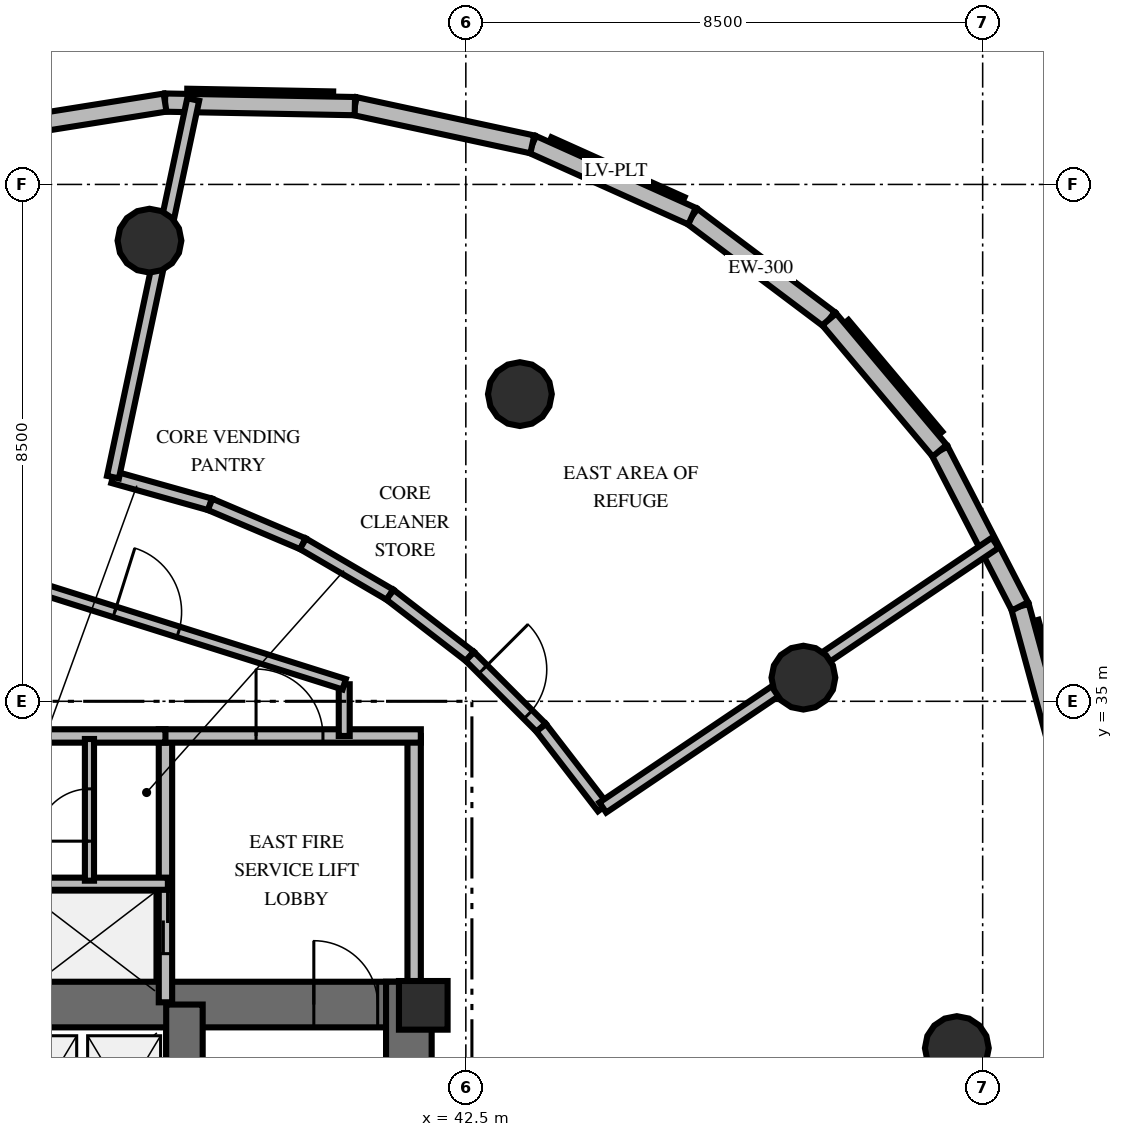
"""IFC4 building model, lengths in metres.
Left out: names, types, materials, properties, quantities, classifications, styles, units other than length and angle.
Written with IfcOpenShell. Run it as: python <this file> out.ifc"""

import sys

from ifc_helpers import new_model, si_unit, direction, frame, frame_2d, origin, origin_2d, place, context, subcontext, project, spatial, rectangle, circle, extrude, element, fill, save


model = new_model("IFC4")
c1 = context("Model", 3, precision=1e-05, world=origin(), true_north=direction((0.0, 1.0)))
c2 = subcontext(c1, "Body", "Model", "MODEL_VIEW")
j1 = project(units=[si_unit("LENGTHUNIT", "METRE"), si_unit("PLANEANGLEUNIT", "RADIAN")], contexts=[c1])
p1 = place(None, origin())
s1 = spatial("IfcSite", under=j1, at=p1, CompositionType="ELEMENT")
p2 = place(p1, origin())
s2 = spatial("IfcBuilding", under=s1, at=p2, CompositionType="ELEMENT")
p3 = place(p2, frame((0.0, 0.0, 225.4)))
s3 = spatial("IfcBuildingStorey", under=s2, at=p3, CompositionType="ELEMENT", Elevation=225.4)
p4 = place(p3, frame((26.072, 30.013, 0.0), z_axis=(0.0, 0.0, 1.0), x_axis=(1.0, 0.0, 0.0)))
e1 = element("IfcWall", 1, at=p4, inside=s3, PredefinedType="SHEAR", context=c2, shape_type="SweptSolid", body=[
    extrude(rectangle(XDim=15.866, YDim=0.75, at=frame_2d((7.933, 0.0))), origin(), (0.0, 0.0, 1.0), 5.0),
])
p5 = place(p4, frame((0.878, 0.0, 0.0)))
e2 = element("IfcOpeningElement", 2, at=p5, cuts=e1, PredefinedType="OPENING", context=c2, shape_type="SweptSolid", body=[
    extrude(rectangle(XDim=1.05, YDim=2.15, at=frame_2d((0.525, 1.075))), frame((0.0, 0.385, 0.0), z_axis=(0.0, -1.0, 0.0), x_axis=(1.0, 0.0, 0.0)), (0.0, 0.0, 1.0), 0.77),
])
p6 = place(p4, frame((13.928, 0.0, 0.0)))
e3 = element("IfcOpeningElement", 3, at=p6, cuts=e1, PredefinedType="OPENING", context=c2, shape_type="SweptSolid", body=[
    extrude(rectangle(XDim=1.05, YDim=2.15, at=frame_2d((0.525, 1.075))), frame((0.0, 0.385, 0.0), z_axis=(0.0, -1.0, 0.0), x_axis=(1.0, 0.0, 0.0)), (0.0, 0.0, 1.0), 0.77),
])
p7 = place(p4, frame((7.378, 0.0, 0.0)))
e4 = element("IfcOpeningElement", 4, at=p7, cuts=e1, PredefinedType="OPENING", context=c2, shape_type="SweptSolid", body=[
    extrude(rectangle(XDim=1.1, YDim=2.15, at=frame_2d((0.55, 1.075))), frame((0.0, 0.385, 0.0), z_axis=(0.0, -1.0, 0.0), x_axis=(1.0, 0.0, 0.0)), (0.0, 0.0, 1.0), 0.77),
])
p8 = place(p3, frame((41.563, 19.812, 0.0), z_axis=(0.0, 0.0, 1.0), x_axis=(0.0, 1.0, 0.0)))
e5 = element("IfcWall", 5, at=p8, inside=s3, PredefinedType="SHEAR", context=c2, shape_type="SweptSolid", body=[
    extrude(rectangle(XDim=10.576, YDim=0.75, at=frame_2d((5.288, 0.0))), origin(), (0.0, 0.0, 1.0), 5.0),
])
p9 = place(p3, frame((37.872, 20.187, 0.0), z_axis=(0.0, 0.0, 1.0), x_axis=(0.0, 1.0, 0.0)))
e6 = element("IfcWall", 6, at=p9, inside=s3, PredefinedType="SHEAR", context=c2, shape_type="SweptSolid", body=[
    extrude(rectangle(XDim=9.826, YDim=0.6, at=frame_2d((4.913, 0.0))), origin(), (0.0, 0.0, 1.0), 5.0),
])
p10 = place(p3, frame((41.8, 30.0, 0.0), z_axis=(0.0, 0.0, 1.0), x_axis=(1.0, 0.0, 0.0)))
e7 = element("IfcColumn", 7, at=p10, inside=s3, PredefinedType="PILASTER", context=c2, shape_type="SweptSolid", body=[
    extrude(rectangle(XDim=0.8, YDim=0.8, at=origin_2d()), origin(), (0.0, 0.0, 1.0), 5.0),
])
for number, where, z_axis, x_axis in (
    (8, (50.575, 29.297, 0.0), (0.0, 0.0, 1.0), (1.0, 0.0, 0.0)),
    (9, (48.052, 35.389, 0.0), (0.0, 0.0, 1.0), (1.0, 0.0, 0.0)),
    (10, (43.389, 40.052, 0.0), (0.0, 0.0, 1.0), (1.0, 0.0, 0.0)),
    (11, (37.297, 42.575, 0.0), (0.0, 0.0, 1.0), (1.0, 0.0, 0.0)),
):
    element("IfcColumn", number, at=place(p3, frame(where, z_axis=z_axis, x_axis=x_axis)), inside=s3, PredefinedType="COLUMN", context=c2, shape_type="SweptSolid", body=[
        extrude(circle(Radius=0.525, at=origin_2d()), origin(), (0.0, 0.0, 1.0), 4.78),
    ])
p11 = place(p3, frame((48.477, 41.282, 0.0), z_axis=(0.0, 0.0, 1.0), x_axis=(-0.799210477485, 0.601051256282, 0.0)))
e12 = element("IfcWall", 12, at=p11, inside=s3, PredefinedType="SOLIDWALL", context=c2, shape_type="SweptSolid", body=[
    extrude(rectangle(XDim=2.823, YDim=0.3, at=frame_2d((1.411, 0.0))), origin(), (0.0, 0.0, 1.0), 4.06),
])
p12 = place(p3, frame((46.221, 42.978, 0.0), z_axis=(0.0, 0.0, 1.0), x_axis=(-0.912125984166, 0.409909976714, 0.0)))
e13 = element("IfcWall", 13, at=p12, inside=s3, PredefinedType="SOLIDWALL", context=c2, shape_type="SweptSolid", body=[
    extrude(rectangle(XDim=2.88, YDim=0.3, at=frame_2d((1.44, 0.0))), origin(), (0.0, 0.0, 1.0), 4.06),
])
p13 = place(p3, frame((43.594, 44.159, 0.0), z_axis=(0.0, 0.0, 1.0), x_axis=(-0.977563651591, 0.210640231409, 0.0)))
e14 = element("IfcWall", 14, at=p13, inside=s3, PredefinedType="SOLIDWALL", context=c2, shape_type="SweptSolid", body=[
    extrude(rectangle(XDim=2.986, YDim=0.3, at=frame_2d((1.493, 0.0))), origin(), (0.0, 0.0, 1.0), 4.06),
])
p14 = place(p3, frame((40.675, 44.788, 0.0), z_axis=(0.0, 0.0, 1.0), x_axis=(-0.999828254486, 0.018532715182, 0.0)))
e15 = element("IfcWall", 15, at=p14, inside=s3, PredefinedType="SOLIDWALL", context=c2, shape_type="SweptSolid", body=[
    extrude(rectangle(XDim=3.122, YDim=0.3, at=frame_2d((1.561, 0.0))), origin(), (0.0, 0.0, 1.0), 4.06),
])
p15 = place(p3, frame((37.553, 44.846, 0.0), z_axis=(0.0, 0.0, 1.0), x_axis=(-0.987548955156, -0.157311986733, 0.0)))
e16 = element("IfcWall", 16, at=p15, inside=s3, PredefinedType="SOLIDWALL", context=c2, shape_type="SweptSolid", body=[
    extrude(rectangle(XDim=3.27, YDim=0.3, at=frame_2d((1.635, 0.0))), origin(), (0.0, 0.0, 1.0), 4.06),
])
p16 = place(p3, frame((52.399, 33.681, 0.0), z_axis=(0.0, 0.0, 1.0), x_axis=(-0.263221190674, 0.964735510272, 0.0)))
e17 = element("IfcWall", 17, at=p16, inside=s3, PredefinedType="SOLIDWALL", context=c2, shape_type="SweptSolid", body=[
    extrude(rectangle(XDim=2.986, YDim=0.3, at=frame_2d((1.493, 0.0))), origin(), (0.0, 0.0, 1.0), 4.06),
])
p17 = place(p3, frame((51.614, 36.562, 0.0), z_axis=(0.0, 0.0, 1.0), x_axis=(-0.45867098927, 0.88860616901, 0.0)))
e18 = element("IfcWall", 18, at=p17, inside=s3, PredefinedType="SOLIDWALL", context=c2, shape_type="SweptSolid", body=[
    extrude(rectangle(XDim=2.88, YDim=0.3, at=frame_2d((1.44, 0.0))), origin(), (0.0, 0.0, 1.0), 4.06),
])
p18 = place(p3, frame((50.292, 39.121, 0.0), z_axis=(0.0, 0.0, 1.0), x_axis=(-0.643352324019, 0.765570236608, 0.0)))
e19 = element("IfcWall", 19, at=p18, inside=s3, PredefinedType="SOLIDWALL", context=c2, shape_type="SweptSolid", body=[
    extrude(rectangle(XDim=2.823, YDim=0.3, at=frame_2d((1.411, 0.0))), origin(), (0.0, 0.0, 1.0), 4.06),
])
p19 = place(p3, frame((37.56, 30.05, 0.0), z_axis=(0.0, 0.0, 1.0), x_axis=(0.0, 1.0, 0.0)))
e20 = element("IfcWall", 20, at=p19, inside=s3, PredefinedType="SOLIDWALL", context=c2, shape_type="SweptSolid", body=[
    extrude(rectangle(XDim=4.38, YDim=0.22, at=frame_2d((2.19, 0.0))), origin(), (0.0, 0.0, 1.0), 2.9),
])
p20 = place(p19, frame((0.8, 0.0, 0.0)))
e21 = element("IfcOpeningElement", 21, at=p20, cuts=e20, PredefinedType="OPENING", context=c2, shape_type="SweptSolid", body=[
    extrude(rectangle(XDim=1.05, YDim=2.1, at=frame_2d((0.525, 1.05))), frame((0.0, 0.12, 0.0), z_axis=(0.0, -1.0, 0.0), x_axis=(1.0, 0.0, 0.0)), (0.0, 0.0, 1.0), 0.24),
])
p21 = place(p3, frame((41.65, 30.05, 0.0), z_axis=(0.0, 0.0, 1.0), x_axis=(0.0, 1.0, 0.0)))
e22 = element("IfcWall", 22, at=p21, inside=s3, PredefinedType="SOLIDWALL", context=c2, shape_type="SweptSolid", body=[
    extrude(rectangle(XDim=4.38, YDim=0.22, at=frame_2d((2.19, 0.0))), origin(), (0.0, 0.0, 1.0), 2.9),
])
p22 = place(p3, frame((37.45, 34.43, 0.0), z_axis=(0.0, 0.0, 1.0), x_axis=(1.0, 0.0, 0.0)))
e23 = element("IfcWall", 23, at=p22, inside=s3, PredefinedType="SOLIDWALL", context=c2, shape_type="SweptSolid", body=[
    extrude(rectangle(XDim=4.31, YDim=0.22, at=frame_2d((2.155, 0.0))), origin(), (0.0, 0.0, 1.0), 2.9),
])
p23 = place(p22, frame((1.6, 0.0, 0.0)))
e24 = element("IfcOpeningElement", 24, at=p23, cuts=e23, PredefinedType="OPENING", context=c2, shape_type="SweptSolid", body=[
    extrude(rectangle(XDim=1.1, YDim=2.15, at=frame_2d((0.55, 1.075))), frame((0.0, 0.12, 0.0), z_axis=(0.0, -1.0, 0.0), x_axis=(1.0, 0.0, 0.0)), (0.0, 0.0, 1.0), 0.24),
])
p24 = place(p3, frame((35.05, 32.0, 0.0), z_axis=(0.0, 0.0, 1.0), x_axis=(1.0, 0.0, 0.0)))
e25 = element("IfcWall", 25, at=p24, inside=s3, PredefinedType="SOLIDWALL", context=c2, shape_type="SweptSolid", body=[
    extrude(rectangle(XDim=2.55, YDim=0.2, at=frame_2d((1.275, 0.0))), origin(), (0.0, 0.0, 1.0), 2.9),
])
p25 = place(p3, frame((30.44, 34.43, 0.0), z_axis=(0.0, 0.0, 1.0), x_axis=(1.0, 0.0, 0.0)))
e26 = element("IfcWall", 26, at=p25, inside=s3, PredefinedType="SOLIDWALL", context=c2, shape_type="SweptSolid", body=[
    extrude(rectangle(XDim=7.12, YDim=0.22, at=frame_2d((3.56, 0.0))), origin(), (0.0, 0.0, 1.0), 2.9),
])
p26 = place(p25, frame((3.01, 0.0, 0.0)))
e27 = element("IfcOpeningElement", 27, at=p26, cuts=e26, PredefinedType="OPENING", context=c2, shape_type="SweptSolid", body=[
    extrude(rectangle(XDim=1.1, YDim=2.15, at=frame_2d((0.55, 1.075))), frame((0.0, 0.12, 0.0), z_axis=(0.0, -1.0, 0.0), x_axis=(1.0, 0.0, 0.0)), (0.0, 0.0, 1.0), 0.24),
])
p27 = place(p3, frame((36.31, 32.05, 0.0), z_axis=(0.0, 0.0, 1.0), x_axis=(0.0, 1.0, 0.0)))
e28 = element("IfcWall", 28, at=p27, inside=s3, PredefinedType="PARTITIONING", context=c2, shape_type="SweptSolid", body=[
    extrude(rectangle(XDim=2.33, YDim=0.15, at=frame_2d((1.165, 0.0))), origin(), (0.0, 0.0, 1.0), 2.9),
])
p28 = place(p27, frame((0.65, 0.0, 0.0)))
e29 = element("IfcOpeningElement", 29, at=p28, cuts=e28, PredefinedType="OPENING", context=c2, shape_type="SweptSolid", body=[
    extrude(rectangle(XDim=0.86, YDim=2.05, at=frame_2d((0.43, 1.025))), frame((0.0, 0.085, 0.0), z_axis=(0.0, -1.0, 0.0), x_axis=(1.0, 0.0, 0.0)), (0.0, 0.0, 1.0), 0.17),
])
p29 = place(p3, frame((40.5, 35.28, 0.0), z_axis=(0.0, 0.0, 1.0), x_axis=(0.0, -1.0, 0.0)))
e30 = element("IfcWall", 30, at=p29, inside=s3, PredefinedType="PARTITIONING", context=c2, shape_type="SweptSolid", body=[
    extrude(rectangle(XDim=0.85, YDim=0.18, at=frame_2d((0.425, 0.0))), origin(), (0.0, 0.0, 1.0), 2.9),
])
p30 = place(p3, frame((34.0, 37.33, 0.0), z_axis=(0.0, 0.0, 1.0), x_axis=(0.953691418528, -0.300786765376, 0.0)))
e31 = element("IfcWall", 31, at=p30, inside=s3, PredefinedType="PARTITIONING", context=c2, shape_type="SweptSolid", body=[
    extrude(rectangle(XDim=6.816, YDim=0.18, at=frame_2d((3.408, 0.0))), origin(), (0.0, 0.0, 1.0), 2.9),
])
p31 = place(p30, frame((2.858, 0.0, 0.0)))
e32 = element("IfcOpeningElement", 32, at=p31, cuts=e31, PredefinedType="OPENING", context=c2, shape_type="SweptSolid", body=[
    extrude(rectangle(XDim=1.1, YDim=2.15, at=frame_2d((0.55, 1.075))), frame((0.0, 0.1, 0.0), z_axis=(0.0, -1.0, 0.0), x_axis=(1.0, 0.0, 0.0)), (0.0, 0.0, 1.0), 0.2),
])
p32 = place(p3, frame((36.697, 38.687, 0.0), z_axis=(0.0, 0.0, 1.0), x_axis=(0.962850837775, -0.270033820467, 0.0)))
e33 = element("IfcWall", 33, at=p32, inside=s3, PredefinedType="SOLIDWALL", context=c2, shape_type="SweptSolid", body=[
    extrude(rectangle(XDim=1.659, YDim=0.2, at=frame_2d((0.83, 0.0))), origin(), (0.0, 0.0, 1.0), 2.9),
])
p33 = place(p3, frame((38.294, 38.239, 0.0), z_axis=(0.0, 0.0, 1.0), x_axis=(0.920487144923, -0.390772844543, 0.0)))
e34 = element("IfcWall", 34, at=p33, inside=s3, PredefinedType="SOLIDWALL", context=c2, shape_type="SweptSolid", body=[
    extrude(rectangle(XDim=1.659, YDim=0.2, at=frame_2d((0.829, 0.0))), origin(), (0.0, 0.0, 1.0), 2.9),
])
for number, where, z_axis, x_axis in (
    (35, (39.821, 37.59, 0.0), (0.0, 0.0, 1.0), (0.863, -0.505, 0.0)),
    (36, (41.253, 36.753, 0.0), (0.0, 0.0, 1.0), (0.792, -0.611, 0.0)),
):
    element("IfcWall", number, at=place(p3, frame(where, z_axis=z_axis, x_axis=x_axis)), inside=s3, PredefinedType="SOLIDWALL", context=c2, shape_type="SweptSolid", body=[
        extrude(rectangle(XDim=1.659, YDim=0.2, at=frame_2d((0.83, 0.0))), origin(), (0.0, 0.0, 1.0), 2.9),
    ])
p34 = place(p3, frame((42.566, 35.739, 0.0), z_axis=(0.0, 0.0, 1.0), x_axis=(0.707106781187, -0.707106781187, 0.0)))
e37 = element("IfcWall", 37, at=p34, inside=s3, PredefinedType="SOLIDWALL", context=c2, shape_type="SweptSolid", body=[
    extrude(rectangle(XDim=1.659, YDim=0.2, at=frame_2d((0.83, 0.0))), origin(), (0.0, 0.0, 1.0), 2.9),
])
p35 = place(p34, frame((0.304, 0.0, 0.0)))
e38 = element("IfcOpeningElement", 38, at=p35, cuts=e37, PredefinedType="OPENING", context=c2, shape_type="SweptSolid", body=[
    extrude(rectangle(XDim=1.05, YDim=2.15, at=frame_2d((0.525, 1.075))), frame((0.0, 0.11, 0.0), z_axis=(0.0, -1.0, 0.0), x_axis=(1.0, 0.0, 0.0)), (0.0, 0.0, 1.0), 0.22),
])
p36 = place(p3, frame((43.739, 34.566, 0.0), z_axis=(0.0, 0.0, 1.0), x_axis=(0.611032763433, -0.791605306962, 0.0)))
e39 = element("IfcWall", 39, at=p36, inside=s3, PredefinedType="SOLIDWALL", context=c2, shape_type="SweptSolid", body=[
    extrude(rectangle(XDim=1.659, YDim=0.2, at=frame_2d((0.83, 0.0))), origin(), (0.0, 0.0, 1.0), 2.9),
])
p37 = place(p3, frame((44.753, 33.253, 0.0), z_axis=(0.0, 0.0, 1.0), x_axis=(0.829032574193, 0.559200313775, 0.0)))
e40 = element("IfcWall", 40, at=p37, inside=s3, PredefinedType="SOLIDWALL", context=c2, shape_type="SweptSolid", body=[
    extrude(rectangle(XDim=7.786, YDim=0.2, at=frame_2d((3.893, 0.0))), origin(), (0.0, 0.0, 1.0), 2.9),
])
p38 = place(p3, frame((36.697, 38.687, 0.0), z_axis=(0.0, 0.0, 1.0), x_axis=(0.207926823578, 0.978144384044, 0.0)))
e41 = element("IfcWall", 41, at=p38, inside=s3, PredefinedType="SOLIDWALL", context=c2, shape_type="SweptSolid", body=[
    extrude(rectangle(XDim=6.349, YDim=0.2, at=frame_2d((3.174, 0.0))), origin(), (0.0, 0.0, 1.0), 2.9),
])
p39 = place(p6, origin())
e42 = element("IfcDoor", 42, at=p39, inside=s3, OperationType="SINGLE_SWING_LEFT", PredefinedType="DOOR", context=c2, shape_type="SweptSolid", body=[
    extrude(rectangle(XDim=1.05, YDim=2.15, at=frame_2d((0.525, 1.075))), frame((0.0, 0.025, 0.0), z_axis=(0.0, -1.0, 0.0), x_axis=(1.0, 0.0, 0.0)), (0.0, 0.0, 1.0), 0.05),
])
fill(e3, e42)
p40 = place(p23, origin())
e43 = element("IfcDoor", 43, at=p40, inside=s3, OperationType="SINGLE_SWING_LEFT", PredefinedType="DOOR", context=c2, shape_type="SweptSolid", body=[
    extrude(rectangle(XDim=1.1, YDim=2.15, at=frame_2d((0.55, 1.075))), frame((0.0, 0.025, 0.0), z_axis=(0.0, -1.0, 0.0), x_axis=(1.0, 0.0, 0.0)), (0.0, 0.0, 1.0), 0.05),
])
fill(e24, e43)
p41 = place(p20, origin())
e44 = element("IfcDoor", 44, at=p41, inside=s3, OperationType="DOUBLE_DOOR_SLIDING", PredefinedType="USERDEFINED", context=c2, shape_type="SweptSolid", body=[
    extrude(rectangle(XDim=1.05, YDim=2.1, at=frame_2d((0.525, 1.05))), frame((0.0, 0.025, 0.0), z_axis=(0.0, -1.0, 0.0), x_axis=(1.0, 0.0, 0.0)), (0.0, 0.0, 1.0), 0.05),
])
fill(e21, e44)
p42 = place(p28, origin())
e45 = element("IfcDoor", 45, at=p42, inside=s3, OperationType="SINGLE_SWING_LEFT", PredefinedType="TRAPDOOR", context=c2, shape_type="SweptSolid", body=[
    extrude(rectangle(XDim=0.86, YDim=2.05, at=frame_2d((0.43, 1.025))), frame((0.0, 0.025, 0.0), z_axis=(0.0, -1.0, 0.0), x_axis=(1.0, 0.0, 0.0)), (0.0, 0.0, 1.0), 0.05),
])
fill(e29, e45)
p43 = place(p31, origin())
e46 = element("IfcDoor", 46, at=p43, inside=s3, OperationType="SINGLE_SWING_LEFT", PredefinedType="DOOR", context=c2, shape_type="SweptSolid", body=[
    extrude(rectangle(XDim=1.1, YDim=2.15, at=frame_2d((0.55, 1.075))), frame((0.0, 0.025, 0.0), z_axis=(0.0, -1.0, 0.0), x_axis=(1.0, 0.0, 0.0)), (0.0, 0.0, 1.0), 0.05),
])
fill(e32, e46)
p44 = place(p35, origin())
e47 = element("IfcDoor", 47, at=p44, inside=s3, OperationType="SINGLE_SWING_LEFT", PredefinedType="DOOR", context=c2, shape_type="SweptSolid", body=[
    extrude(rectangle(XDim=1.05, YDim=2.15, at=frame_2d((0.525, 1.075))), frame((0.0, 0.025, 0.0), z_axis=(0.0, -1.0, 0.0), x_axis=(1.0, 0.0, 0.0)), (0.0, 0.0, 1.0), 0.05),
])
fill(e38, e47)
save(model, sys.argv[1])
